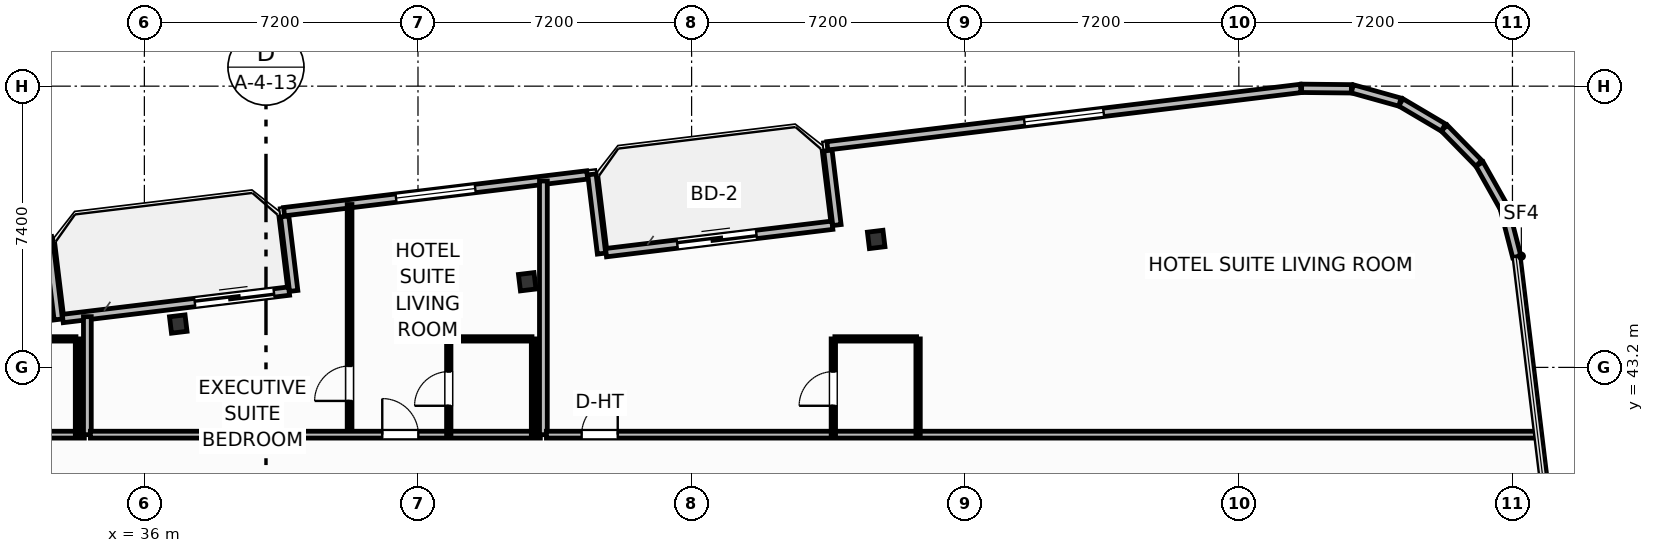
"""IFC4 building model, lengths in metres.
Left out: names, types, materials, properties, quantities, classifications, styles, units other than length and angle.
Written with IfcOpenShell. Run it as: python <this file> out.ifc"""

import sys

from ifc_helpers import new_model, si_unit, direction, frame, frame_2d, origin, origin_2d, place, context, subcontext, project, spatial, rectangle, i_section, extrude, element, fill, save


model = new_model("IFC4")
c1 = context("Model", 3, precision=1e-05, world=origin(), true_north=direction((0.0, 1.0)))
c2 = subcontext(c1, "Body", "Model", "MODEL_VIEW")
j1 = project(units=[si_unit("LENGTHUNIT", "METRE"), si_unit("PLANEANGLEUNIT", "RADIAN")], contexts=[c1])
p1 = place(None, origin())
s1 = spatial("IfcSite", under=j1, at=p1, CompositionType="ELEMENT")
p2 = place(p1, origin())
s2 = spatial("IfcBuilding", under=s1, at=p2, CompositionType="ELEMENT")
p3 = place(p2, frame((0.0, 0.0, 174.6)))
s3 = spatial("IfcBuildingStorey", under=s2, at=p3, CompositionType="ELEMENT", Elevation=174.6)
for number, where, z_axis, x_axis in (
    (1, (55.257, 46.567, 0.0), (0.0, 0.0, 1.0), (0.993, 0.12, 0.0)),
    (2, (46.075, 45.454, 0.0), (0.0, 0.0, 1.0), (0.993, 0.12, 0.0)),
    (3, (36.892, 44.341, 0.0), (0.0, 0.0, 1.0), (0.993, 0.12, 0.0)),
):
    element("IfcColumn", number, at=place(p3, frame(where, z_axis=z_axis, x_axis=x_axis)), inside=s3, PredefinedType="COLUMN", context=c2, shape_type="SweptSolid", body=[
        extrude(i_section(OverallWidth=0.412, OverallDepth=0.435, WebThickness=0.036, FlangeThickness=0.057, FilletRadius=0.025, at=origin_2d()), origin(), (0.0, 0.0, 1.0), 3.7),
    ])
p4 = place(p3, frame((33.852, 44.486, 0.0), z_axis=(0.0, 0.0, 1.0), x_axis=(0.992729951822, 0.120362962556, 0.0)))
e4 = element("IfcWall", 4, at=p4, inside=s3, PredefinedType="SOLIDWALL", context=c2, shape_type="SweptSolid", body=[
    extrude(rectangle(XDim=6.0, YDim=0.22, at=frame_2d((3.0, 0.0))), origin(), (0.0, 0.0, 1.0), 2.73),
])
p5 = place(p4, frame((3.5, 0.0, 0.0)))
e5 = element("IfcOpeningElement", 5, at=p5, cuts=e4, PredefinedType="OPENING", context=c2, shape_type="SweptSolid", body=[
    extrude(rectangle(XDim=2.1, YDim=2.3, at=frame_2d((1.05, 1.15))), frame((0.0, 0.12, 0.0), z_axis=(0.0, -1.0, 0.0), x_axis=(1.0, 0.0, 0.0)), (0.0, 0.0, 1.0), 0.24),
])
p6 = place(p3, frame((48.148, 46.219, 0.0), z_axis=(0.0, 0.0, 1.0), x_axis=(0.992729951822, 0.120362962556, 0.0)))
e6 = element("IfcWall", 6, at=p6, inside=s3, PredefinedType="SOLIDWALL", context=c2, shape_type="SweptSolid", body=[
    extrude(rectangle(XDim=6.0, YDim=0.22, at=frame_2d((3.0, 0.0))), origin(), (0.0, 0.0, 1.0), 2.73),
])
p7 = place(p6, frame((1.888, 0.0, 0.0)))
e7 = element("IfcOpeningElement", 7, at=p7, cuts=e6, PredefinedType="OPENING", context=c2, shape_type="SweptSolid", body=[
    extrude(rectangle(XDim=2.1, YDim=2.3, at=frame_2d((1.05, 1.15))), frame((0.0, 0.12, 0.0), z_axis=(0.0, -1.0, 0.0), x_axis=(1.0, 0.0, 0.0)), (0.0, 0.0, 1.0), 0.24),
])
p8 = place(p3, frame((72.114, 46.112, 0.0), z_axis=(0.0, 0.0, 1.0), x_axis=(-0.248942347653, 0.968518305219, 0.0)))
e8 = element("IfcWall", 8, at=p8, inside=s3, PredefinedType="SOLIDWALL", context=c2, shape_type="SweptSolid", body=[
    extrude(rectangle(XDim=1.326, YDim=0.22, at=frame_2d((0.663, 0.0))), origin(), (0.0, 0.0, 1.0), 2.73),
])
p9 = place(p3, frame((71.771, 47.418, 0.0), z_axis=(0.0, 0.0, 1.0), x_axis=(-0.491098509465, 0.871104043155, 0.0)))
e9 = element("IfcWall", 9, at=p9, inside=s3, PredefinedType="SOLIDWALL", context=c2, shape_type="SweptSolid", body=[
    extrude(rectangle(XDim=1.301, YDim=0.22, at=frame_2d((0.65, 0.0))), origin(), (0.0, 0.0, 1.0), 2.73),
])
p10 = place(p3, frame((71.115, 48.569, 0.0), z_axis=(0.0, 0.0, 1.0), x_axis=(-0.699844331926, 0.714295394827, 0.0)))
e10 = element("IfcWall", 10, at=p10, inside=s3, PredefinedType="SOLIDWALL", context=c2, shape_type="SweptSolid", body=[
    extrude(rectangle(XDim=1.301, YDim=0.22, at=frame_2d((0.65, 0.0))), origin(), (0.0, 0.0, 1.0), 2.73),
])
p11 = place(p3, frame((70.183, 49.511, 0.0), z_axis=(0.0, 0.0, 1.0), x_axis=(-0.860933999601, 0.508716668029, 0.0)))
e11 = element("IfcWall", 11, at=p11, inside=s3, PredefinedType="SOLIDWALL", context=c2, shape_type="SweptSolid", body=[
    extrude(rectangle(XDim=1.301, YDim=0.22, at=frame_2d((0.65, 0.0))), origin(), (0.0, 0.0, 1.0), 2.73),
])
p12 = place(p3, frame((69.039, 50.18, 0.0), z_axis=(0.0, 0.0, 1.0), x_axis=(-0.963205341366, 0.26876657226, 0.0)))
e12 = element("IfcWall", 12, at=p12, inside=s3, PredefinedType="SOLIDWALL", context=c2, shape_type="SweptSolid", body=[
    extrude(rectangle(XDim=1.301, YDim=0.22, at=frame_2d((0.65, 0.0))), origin(), (0.0, 0.0, 1.0), 2.73),
])
p13 = place(p3, frame((67.761, 50.53, 0.0), z_axis=(0.0, 0.0, 1.0), x_axis=(-0.999947358106, 0.010260653861, 0.0)))
e13 = element("IfcWall", 13, at=p13, inside=s3, PredefinedType="SOLIDWALL", context=c2, shape_type="SweptSolid", body=[
    extrude(rectangle(XDim=1.309, YDim=0.22, at=frame_2d((0.654, 0.0))), origin(), (0.0, 0.0, 1.0), 2.73),
])
p14 = place(p3, frame((66.427, 50.54, 0.0), z_axis=(0.0, 0.0, 1.0), x_axis=(-0.992731739233, -0.120348219431, 0.0)))
e14 = element("IfcWall", 14, at=p14, inside=s3, PredefinedType="SOLIDWALL", context=c2, shape_type="SweptSolid", body=[
    extrude(rectangle(XDim=12.547, YDim=0.22, at=frame_2d((6.273, 0.0))), origin(), (0.0, 0.0, 1.0), 2.73),
])
p15 = place(p14, frame((5.224, 0.0, 0.8)))
e15 = element("IfcOpeningElement", 15, at=p15, cuts=e14, PredefinedType="OPENING", context=c2, shape_type="SweptSolid", body=[
    extrude(rectangle(XDim=2.1, YDim=1.75, at=frame_2d((1.05, 0.875))), frame((0.0, 0.12, 0.0), z_axis=(0.0, -1.0, 0.0), x_axis=(1.0, 0.0, 0.0)), (0.0, 0.0, 1.0), 0.24),
])
p16 = place(p3, frame((53.987, 48.906, 0.0), z_axis=(0.0, 0.0, 1.0), x_axis=(0.120397815541, -0.992725725472, 0.0)))
e16 = element("IfcWall", 16, at=p16, inside=s3, PredefinedType="SOLIDWALL", context=c2, shape_type="SweptSolid", body=[
    extrude(rectangle(XDim=1.975, YDim=0.22, at=frame_2d((0.988, 0.0))), origin(), (0.0, 0.0, 1.0), 2.73),
])
p17 = place(p3, frame((48.03, 46.194, 0.0), z_axis=(0.0, 0.0, 1.0), x_axis=(-0.120314009587, 0.992735885871, 0.0)))
e17 = element("IfcWall", 17, at=p17, inside=s3, PredefinedType="SOLIDWALL", context=c2, shape_type="SweptSolid", body=[
    extrude(rectangle(XDim=2.1, YDim=0.22, at=frame_2d((1.05, 0.0))), origin(), (0.0, 0.0, 1.0), 2.73),
])
p18 = place(p3, frame((47.653, 48.264, 0.0), z_axis=(0.0, 0.0, 1.0), x_axis=(-0.992731032022, -0.120354052946, 0.0)))
e18 = element("IfcWall", 18, at=p18, inside=s3, PredefinedType="SOLIDWALL", context=c2, shape_type="SweptSolid", body=[
    extrude(rectangle(XDim=8.035, YDim=0.22, at=frame_2d((4.018, 0.0))), origin(), (0.0, 0.0, 1.0), 2.73),
])
p19 = place(p18, frame((2.968, 0.0, 0.8)))
e19 = element("IfcOpeningElement", 19, at=p19, cuts=e18, PredefinedType="OPENING", context=c2, shape_type="SweptSolid", body=[
    extrude(rectangle(XDim=2.1, YDim=1.75, at=frame_2d((1.05, 0.875))), frame((0.0, 0.12, 0.0), z_axis=(0.0, -1.0, 0.0), x_axis=(1.0, 0.0, 0.0)), (0.0, 0.0, 1.0), 0.24),
])
p20 = place(p3, frame((39.691, 47.173, 0.0), z_axis=(0.0, 0.0, 1.0), x_axis=(0.120397815541, -0.992725725472, 0.0)))
e20 = element("IfcWall", 20, at=p20, inside=s3, PredefinedType="SOLIDWALL", context=c2, shape_type="SweptSolid", body=[
    extrude(rectangle(XDim=1.975, YDim=0.22, at=frame_2d((0.988, 0.0))), origin(), (0.0, 0.0, 1.0), 2.73),
])
p21 = place(p3, frame((33.734, 44.461, 0.0), z_axis=(0.0, 0.0, 1.0), x_axis=(-0.120327895535, 0.992734202874, 0.0)))
e21 = element("IfcWall", 21, at=p21, inside=s3, PredefinedType="SOLIDWALL", context=c2, shape_type="SweptSolid", body=[
    extrude(rectangle(XDim=2.1, YDim=0.22, at=frame_2d((1.05, 0.0))), origin(), (0.0, 0.0, 1.0), 2.73),
])
p22 = place(p3, frame((3.393, 41.43, 0.0), z_axis=(0.0, 0.0, 1.0), x_axis=(1.0, 0.0, 0.0)))
e22 = element("IfcWall", 22, at=p22, inside=s3, PredefinedType="PARTITIONING", context=c2, shape_type="SweptSolid", body=[
    extrude(rectangle(XDim=31.027, YDim=0.18, at=frame_2d((15.513, 0.0))), origin(), (0.0, 0.0, 1.0), 2.662),
])
p23 = place(p22, frame((21.621, 0.0, 0.0)))
e23 = element("IfcOpeningElement", 23, at=p23, cuts=e22, PredefinedType="OPENING", context=c2, shape_type="SweptSolid", body=[
    extrude(rectangle(XDim=0.95, YDim=2.15, at=frame_2d((0.475, 1.075))), frame((0.0, 0.1, 0.0), z_axis=(0.0, -1.0, 0.0), x_axis=(1.0, 0.0, 0.0)), (0.0, 0.0, 1.0), 0.2),
])
p24 = place(p3, frame((32.05, 43.95, 0.0), z_axis=(0.0, 0.0, 1.0), x_axis=(1.0, 0.0, 0.0)))
e24 = element("IfcWall", 24, at=p24, inside=s3, PredefinedType="PARTITIONING", context=c2, shape_type="SweptSolid", body=[
    extrude(rectangle(XDim=2.15, YDim=0.115, at=frame_2d((1.075, 0.0))), origin(), (0.0, 0.0, 1.0), 2.824),
])
p25 = place(p3, frame((34.24, 41.43, 0.0), z_axis=(0.0, 0.0, 1.0), x_axis=(0.0, 1.0, 0.0)))
e25 = element("IfcWall", 25, at=p25, inside=s3, PredefinedType="PARTITIONING", context=c2, shape_type="SweptSolid", body=[
    extrude(rectangle(XDim=2.52, YDim=0.115, at=frame_2d((1.26, 0.0))), origin(), (0.0, 0.0, 1.0), 3.45),
])
p26 = place(p3, frame((34.5, 41.43, 0.0), z_axis=(0.0, 0.0, 1.0), x_axis=(0.0, 1.0, 0.0)))
e26 = element("IfcWall", 26, at=p26, inside=s3, PredefinedType="PARTITIONING", context=c2, shape_type="SweptSolid", body=[
    extrude(rectangle(XDim=3.104, YDim=0.205, at=frame_2d((1.552, 0.0))), origin(), (0.0, 0.0, 1.0), 3.45),
])
p27 = place(p3, frame((41.4, 41.43, 0.0), z_axis=(0.0, 0.0, 1.0), x_axis=(0.0, 1.0, 0.0)))
e27 = element("IfcWall", 27, at=p27, inside=s3, PredefinedType="PARTITIONING", context=c2, shape_type="SweptSolid", body=[
    extrude(rectangle(XDim=6.056, YDim=0.125, at=frame_2d((3.028, 0.0))), origin(), (0.0, 0.0, 1.0), 3.45),
])
p28 = place(p27, frame((0.888, 0.0, 0.0)))
e28 = element("IfcOpeningElement", 28, at=p28, cuts=e27, PredefinedType="OPENING", context=c2, shape_type="SweptSolid", body=[
    extrude(rectangle(XDim=0.92, YDim=2.05, at=frame_2d((0.46, 1.025))), frame((0.0, 0.073, 0.0), z_axis=(0.0, -1.0, 0.0), x_axis=(1.0, 0.0, 0.0)), (0.0, 0.0, 1.0), 0.145),
])
p29 = place(p3, frame((34.58, 41.43, 0.0), z_axis=(0.0, 0.0, 1.0), x_axis=(1.0, 0.0, 0.0)))
e29 = element("IfcWall", 29, at=p29, inside=s3, PredefinedType="PARTITIONING", context=c2, shape_type="SweptSolid", body=[
    extrude(rectangle(XDim=11.84, YDim=0.18, at=frame_2d((5.92, 0.0))), origin(), (0.0, 0.0, 1.0), 3.45),
])
p30 = place(p29, frame((7.68, 0.0, 0.0)))
e30 = element("IfcOpeningElement", 30, at=p30, cuts=e29, PredefinedType="OPENING", context=c2, shape_type="SweptSolid", body=[
    extrude(rectangle(XDim=0.95, YDim=2.15, at=frame_2d((0.475, 1.075))), frame((0.0, 0.1, 0.0), z_axis=(0.0, -1.0, 0.0), x_axis=(1.0, 0.0, 0.0)), (0.0, 0.0, 1.0), 0.2),
])
p31 = place(p3, frame((44.05, 43.95, 0.0), z_axis=(0.0, 0.0, 1.0), x_axis=(1.0, 0.0, 0.0)))
e31 = element("IfcWall", 31, at=p31, inside=s3, PredefinedType="PARTITIONING", context=c2, shape_type="SweptSolid", body=[
    extrude(rectangle(XDim=2.15, YDim=0.115, at=frame_2d((1.075, 0.0))), origin(), (0.0, 0.0, 1.0), 3.45),
])
p32 = place(p3, frame((44.01, 41.43, 0.0), z_axis=(0.0, 0.0, 1.0), x_axis=(0.0, 1.0, 0.0)))
e32 = element("IfcWall", 32, at=p32, inside=s3, PredefinedType="PARTITIONING", context=c2, shape_type="SweptSolid", body=[
    extrude(rectangle(XDim=2.52, YDim=0.115, at=frame_2d((1.26, 0.0))), origin(), (0.0, 0.0, 1.0), 3.45),
])
p33 = place(p32, frame((0.76, 0.0, 0.0)))
e33 = element("IfcOpeningElement", 33, at=p33, cuts=e32, PredefinedType="OPENING", context=c2, shape_type="SweptSolid", body=[
    extrude(rectangle(XDim=0.9, YDim=2.05, at=frame_2d((0.45, 1.025))), frame((0.0, 0.067, 0.0), z_axis=(0.0, -1.0, 0.0), x_axis=(1.0, 0.0, 0.0)), (0.0, 0.0, 1.0), 0.135),
])
p34 = place(p3, frame((46.24, 41.43, 0.0), z_axis=(0.0, 0.0, 1.0), x_axis=(0.0, 1.0, 0.0)))
e34 = element("IfcWall", 34, at=p34, inside=s3, PredefinedType="PARTITIONING", context=c2, shape_type="SweptSolid", body=[
    extrude(rectangle(XDim=2.52, YDim=0.115, at=frame_2d((1.26, 0.0))), origin(), (0.0, 0.0, 1.0), 3.45),
])
p35 = place(p3, frame((46.5, 41.43, 0.0), z_axis=(0.0, 0.0, 1.0), x_axis=(0.0, 1.0, 0.0)))
e35 = element("IfcWall", 35, at=p35, inside=s3, PredefinedType="PARTITIONING", context=c2, shape_type="SweptSolid", body=[
    extrude(rectangle(XDim=6.674, YDim=0.205, at=frame_2d((3.337, 0.0))), origin(), (0.0, 0.0, 1.0), 2.662),
])
p36 = place(p3, frame((46.58, 41.43, 0.0), z_axis=(0.0, 0.0, 1.0), x_axis=(1.0, 0.0, 0.0)))
e36 = element("IfcWall", 36, at=p36, inside=s3, PredefinedType="PARTITIONING", context=c2, shape_type="SweptSolid", body=[
    extrude(rectangle(XDim=26.042, YDim=0.18, at=frame_2d((13.021, 0.0))), origin(), (0.0, 0.0, 1.0), 3.45),
])
p37 = place(p36, frame((0.926, 0.0, 0.0)))
e37 = element("IfcOpeningElement", 37, at=p37, cuts=e36, PredefinedType="OPENING", context=c2, shape_type="SweptSolid", body=[
    extrude(rectangle(XDim=0.95, YDim=2.15, at=frame_2d((0.475, 1.075))), frame((0.0, 0.1, 0.0), z_axis=(0.0, -1.0, 0.0), x_axis=(1.0, 0.0, 0.0)), (0.0, 0.0, 1.0), 0.2),
])
p38 = place(p3, frame((54.17, 43.95, 0.0), z_axis=(0.0, 0.0, 1.0), x_axis=(1.0, 0.0, 0.0)))
e38 = element("IfcWall", 38, at=p38, inside=s3, PredefinedType="PARTITIONING", context=c2, shape_type="SweptSolid", body=[
    extrude(rectangle(XDim=2.15, YDim=0.115, at=frame_2d((1.075, 0.0))), origin(), (0.0, 0.0, 1.0), 3.45),
])
p39 = place(p3, frame((54.13, 41.43, 0.0), z_axis=(0.0, 0.0, 1.0), x_axis=(0.0, 1.0, 0.0)))
e39 = element("IfcWall", 39, at=p39, inside=s3, PredefinedType="PARTITIONING", context=c2, shape_type="SweptSolid", body=[
    extrude(rectangle(XDim=2.52, YDim=0.115, at=frame_2d((1.26, 0.0))), origin(), (0.0, 0.0, 1.0), 3.45),
])
p40 = place(p39, frame((0.76, 0.0, 0.0)))
e40 = element("IfcOpeningElement", 40, at=p40, cuts=e39, PredefinedType="OPENING", context=c2, shape_type="SweptSolid", body=[
    extrude(rectangle(XDim=0.9, YDim=2.05, at=frame_2d((0.45, 1.025))), frame((0.0, 0.067, 0.0), z_axis=(0.0, -1.0, 0.0), x_axis=(1.0, 0.0, 0.0)), (0.0, 0.0, 1.0), 0.135),
])
p41 = place(p3, frame((56.36, 41.43, 0.0), z_axis=(0.0, 0.0, 1.0), x_axis=(0.0, 1.0, 0.0)))
e41 = element("IfcWall", 41, at=p41, inside=s3, PredefinedType="PARTITIONING", context=c2, shape_type="SweptSolid", body=[
    extrude(rectangle(XDim=2.52, YDim=0.115, at=frame_2d((1.26, 0.0))), origin(), (0.0, 0.0, 1.0), 3.45),
])
p42 = place(p5, origin())
e42 = element("IfcDoor", 42, at=p42, inside=s3, OperationType="SLIDING_TO_LEFT", PredefinedType="DOOR", context=c2, shape_type="SweptSolid", body=[
    extrude(rectangle(XDim=2.1, YDim=2.3, at=frame_2d((1.05, 1.15))), frame((0.0, 0.025, 0.0), z_axis=(0.0, -1.0, 0.0), x_axis=(1.0, 0.0, 0.0)), (0.0, 0.0, 1.0), 0.05),
])
fill(e5, e42)
p43 = place(p7, origin())
e43 = element("IfcDoor", 43, at=p43, inside=s3, OperationType="SLIDING_TO_LEFT", PredefinedType="DOOR", context=c2, shape_type="SweptSolid", body=[
    extrude(rectangle(XDim=2.1, YDim=2.3, at=frame_2d((1.05, 1.15))), frame((0.0, 0.025, 0.0), z_axis=(0.0, -1.0, 0.0), x_axis=(1.0, 0.0, 0.0)), (0.0, 0.0, 1.0), 0.05),
])
fill(e7, e43)
p44 = place(p15, origin())
e44 = element("IfcWindow", 44, at=p44, inside=s3, PartitioningType="SINGLE_PANEL", PredefinedType="WINDOW", context=c2, shape_type="SweptSolid", body=[
    extrude(rectangle(XDim=2.1, YDim=1.75, at=frame_2d((1.05, 0.875))), frame((0.0, 0.03, 0.0), z_axis=(0.0, -1.0, 0.0), x_axis=(1.0, 0.0, 0.0)), (0.0, 0.0, 1.0), 0.06),
])
fill(e15, e44)
p45 = place(p19, origin())
e45 = element("IfcWindow", 45, at=p45, inside=s3, PartitioningType="SINGLE_PANEL", PredefinedType="WINDOW", context=c2, shape_type="SweptSolid", body=[
    extrude(rectangle(XDim=2.1, YDim=1.75, at=frame_2d((1.05, 0.875))), frame((0.0, 0.03, 0.0), z_axis=(0.0, -1.0, 0.0), x_axis=(1.0, 0.0, 0.0)), (0.0, 0.0, 1.0), 0.06),
])
fill(e19, e45)
p46 = place(p28, origin())
e46 = element("IfcDoor", 46, at=p46, inside=s3, OperationType="SINGLE_SWING_LEFT", PredefinedType="DOOR", context=c2, shape_type="SweptSolid", body=[
    extrude(rectangle(XDim=0.92, YDim=2.05, at=frame_2d((0.46, 1.025))), frame((0.0, 0.025, 0.0), z_axis=(0.0, -1.0, 0.0), x_axis=(1.0, 0.0, 0.0)), (0.0, 0.0, 1.0), 0.05),
])
fill(e28, e46)
p47 = place(p30, origin())
e47 = element("IfcDoor", 47, at=p47, inside=s3, OperationType="SINGLE_SWING_LEFT", PredefinedType="DOOR", context=c2, shape_type="SweptSolid", body=[
    extrude(rectangle(XDim=0.95, YDim=2.15, at=frame_2d((0.475, 1.075))), frame((0.0, 0.025, 0.0), z_axis=(0.0, -1.0, 0.0), x_axis=(1.0, 0.0, 0.0)), (0.0, 0.0, 1.0), 0.05),
])
fill(e30, e47)
p48 = place(p33, origin())
e48 = element("IfcDoor", 48, at=p48, inside=s3, OperationType="SINGLE_SWING_LEFT", PredefinedType="DOOR", context=c2, shape_type="SweptSolid", body=[
    extrude(rectangle(XDim=0.9, YDim=2.05, at=frame_2d((0.45, 1.025))), frame((0.0, 0.025, 0.0), z_axis=(0.0, -1.0, 0.0), x_axis=(1.0, 0.0, 0.0)), (0.0, 0.0, 1.0), 0.05),
])
fill(e33, e48)
p49 = place(p37, origin())
e49 = element("IfcDoor", 49, at=p49, inside=s3, OperationType="SINGLE_SWING_RIGHT", PredefinedType="DOOR", context=c2, shape_type="SweptSolid", body=[
    extrude(rectangle(XDim=0.95, YDim=2.15, at=frame_2d((0.475, 1.075))), frame((0.0, 0.025, 0.0), z_axis=(0.0, -1.0, 0.0), x_axis=(1.0, 0.0, 0.0)), (0.0, 0.0, 1.0), 0.05),
])
fill(e37, e49)
p50 = place(p40, origin())
e50 = element("IfcDoor", 50, at=p50, inside=s3, OperationType="SINGLE_SWING_LEFT", PredefinedType="DOOR", context=c2, shape_type="SweptSolid", body=[
    extrude(rectangle(XDim=0.9, YDim=2.05, at=frame_2d((0.45, 1.025))), frame((0.0, 0.025, 0.0), z_axis=(0.0, -1.0, 0.0), x_axis=(1.0, 0.0, 0.0)), (0.0, 0.0, 1.0), 0.05),
])
fill(e40, e50)
save(model, sys.argv[1])
